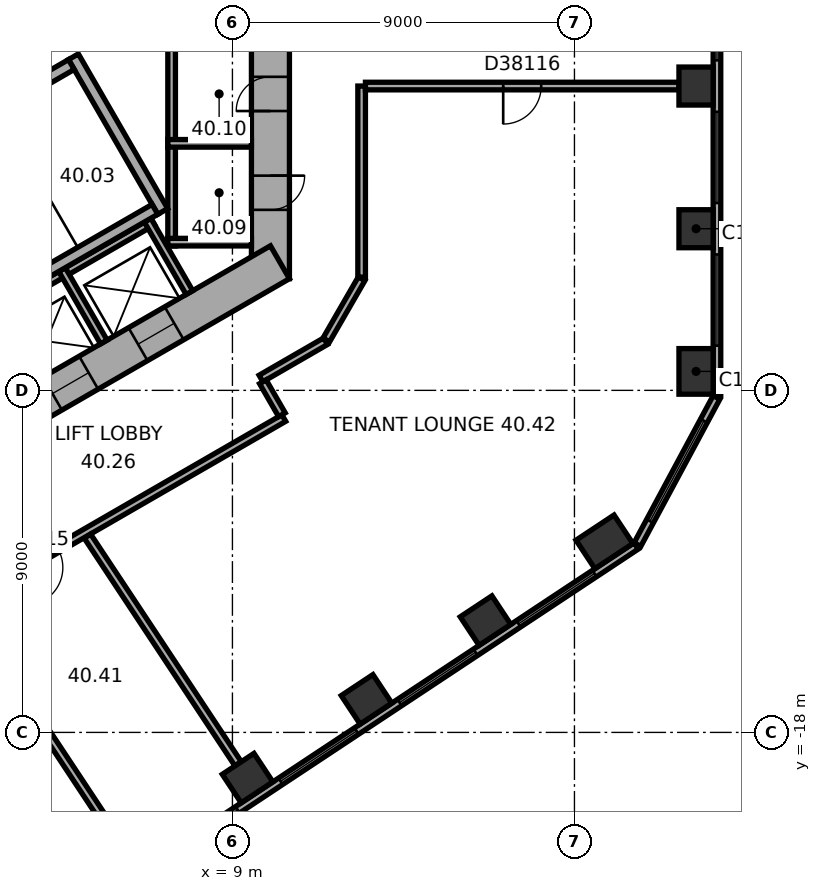
"""IFC4 building model, lengths in metres.
Left out: names, types, materials, properties, quantities, classifications, styles, units other than length and angle.
Written with IfcOpenShell. Run it as: python <this file> out.ifc"""

import sys

from ifc_helpers import new_model, si_unit, direction, frame, frame_2d, origin, origin_2d, place, context, subcontext, project, spatial, rectangle, extrude, element, fill, save


model = new_model("IFC4")
c1 = context("Model", 3, precision=1e-05, world=origin(), true_north=direction((0.0, 1.0)))
c2 = subcontext(c1, "Body", "Model", "MODEL_VIEW")
j1 = project(units=[si_unit("LENGTHUNIT", "METRE"), si_unit("PLANEANGLEUNIT", "RADIAN")], contexts=[c1])
p1 = place(None, origin())
s1 = spatial("IfcSite", under=j1, at=p1, CompositionType="ELEMENT")
p2 = place(p1, origin())
s2 = spatial("IfcBuilding", under=s1, at=p2, CompositionType="ELEMENT")
p3 = place(p2, frame((0.0, 0.0, 165.1)))
s3 = spatial("IfcBuildingStorey", under=s2, at=p3, CompositionType="ELEMENT", Elevation=165.1)
p4 = place(p3, frame((21.2, -8.501, 0.0), z_axis=(0.0, 0.0, 1.0), x_axis=(0.0, 1.0, 0.0)))
e1 = element("IfcColumn", 1, at=p4, inside=s3, PredefinedType="COLUMN", context=c2, shape_type="SweptSolid", body=[
    extrude(rectangle(XDim=1.2, YDim=0.9, at=origin_2d()), origin(), (0.0, 0.0, 1.0), 3.7),
])
for number, where, z_axis, x_axis in (
    (2, (21.2, -4.747, 0.0), (0.0, 0.0, 1.0), (0.0, 1.0, 0.0)),
    (3, (21.2, -0.993, 0.0), (0.0, 0.0, 1.0), (0.0, 1.0, 0.0)),
    (4, (9.398, -19.202, 0.0), (0.0, 0.0, 1.0), (0.834, 0.552, 0.0)),
    (5, (12.529, -17.13, 0.0), (0.0, 0.0, 1.0), (0.834, 0.552, 0.0)),
    (6, (15.659, -15.058, 0.0), (0.0, 0.0, 1.0), (0.834, 0.552, 0.0)),
):
    element("IfcColumn", number, at=place(p3, frame(where, z_axis=z_axis, x_axis=x_axis)), inside=s3, PredefinedType="COLUMN", context=c2, shape_type="SweptSolid", body=[
        extrude(rectangle(XDim=1.0, YDim=0.9, at=origin_2d()), origin(), (0.0, 0.0, 1.0), 3.7),
    ])
p5 = place(p3, frame((18.79, -12.986, 0.0), z_axis=(0.0, 0.0, 1.0), x_axis=(0.833885822067, 0.551936985312, 0.0)))
e7 = element("IfcColumn", 7, at=p5, inside=s3, PredefinedType="COLUMN", context=c2, shape_type="SweptSolid", body=[
    extrude(rectangle(XDim=1.2, YDim=0.9, at=origin_2d()), origin(), (0.0, 0.0, 1.0), 3.7),
])
p6 = place(p3, frame((10.0, -6.062, 0.0), z_axis=(0.0, 0.0, 1.0), x_axis=(0.0, 1.0, 0.0)))
e8 = element("IfcWall", 8, at=p6, inside=s3, PredefinedType="SHEAR", context=c2, shape_type="SweptSolid", body=[
    extrude(rectangle(XDim=12.125, YDim=1.0, at=frame_2d((6.062, 0.0))), origin(), (0.0, 0.0, 1.0), 3.7),
])
p7 = place(p6, frame((6.262, 0.0, 0.0)))
e9 = element("IfcOpeningElement", 9, at=p7, cuts=e8, PredefinedType="OPENING", context=c2, shape_type="SweptSolid", body=[
    extrude(rectangle(XDim=1.5, YDim=2.1, at=frame_2d((0.75, 1.05))), frame((0.0, 0.51, 0.0), z_axis=(0.0, -1.0, 0.0), x_axis=(1.0, 0.0, 0.0)), (0.0, 0.0, 1.0), 1.02),
])
p8 = place(p6, frame((1.812, 0.0, 0.0)))
e10 = element("IfcOpeningElement", 10, at=p8, cuts=e8, PredefinedType="OPENING", context=c2, shape_type="SweptSolid", body=[
    extrude(rectangle(XDim=0.9, YDim=2.1, at=frame_2d((0.45, 1.05))), frame((0.0, 0.51, 0.0), z_axis=(0.0, -1.0, 0.0), x_axis=(1.0, 0.0, 0.0)), (0.0, 0.0, 1.0), 1.02),
])
p9 = place(p6, frame((4.412, 0.0, 0.0)))
e11 = element("IfcOpeningElement", 11, at=p9, cuts=e8, PredefinedType="OPENING", context=c2, shape_type="SweptSolid", body=[
    extrude(rectangle(XDim=0.9, YDim=2.1, at=frame_2d((0.45, 1.05))), frame((0.0, 0.51, 0.0), z_axis=(0.0, -1.0, 0.0), x_axis=(1.0, 0.0, 0.0)), (0.0, 0.0, 1.0), 1.02),
])
p10 = place(p3, frame((-0.25, -11.691, 0.0), z_axis=(0.0, 0.0, 1.0), x_axis=(0.866022616891, 0.50000482701, 0.0)))
e12 = element("IfcWall", 12, at=p10, inside=s3, PredefinedType="SHEAR", context=c2, shape_type="SweptSolid", body=[
    extrude(rectangle(XDim=12.125, YDim=1.0, at=frame_2d((6.062, 0.0))), origin(), (0.0, 0.0, 1.0), 3.7),
])
p11 = place(p10, frame((2.612, 0.0, 0.0)))
e13 = element("IfcOpeningElement", 13, at=p11, cuts=e12, PredefinedType="OPENING", context=c2, shape_type="SweptSolid", body=[
    extrude(rectangle(XDim=1.1, YDim=2.1, at=frame_2d((0.55, 1.05))), frame((0.0, 0.51, 0.0), z_axis=(0.0, -1.0, 0.0), x_axis=(1.0, 0.0, 0.0)), (0.0, 0.0, 1.0), 1.02),
])
p12 = place(p10, frame((5.212, 0.0, 0.0)))
e14 = element("IfcOpeningElement", 14, at=p12, cuts=e12, PredefinedType="OPENING", context=c2, shape_type="SweptSolid", body=[
    extrude(rectangle(XDim=1.1, YDim=2.1, at=frame_2d((0.55, 1.05))), frame((0.0, 0.51, 0.0), z_axis=(0.0, -1.0, 0.0), x_axis=(1.0, 0.0, 0.0)), (0.0, 0.0, 1.0), 1.02),
])
p13 = place(p10, frame((7.812, 0.0, 0.0)))
e15 = element("IfcOpeningElement", 15, at=p13, cuts=e12, PredefinedType="OPENING", context=c2, shape_type="SweptSolid", body=[
    extrude(rectangle(XDim=1.1, YDim=2.1, at=frame_2d((0.55, 1.05))), frame((0.0, 0.51, 0.0), z_axis=(0.0, -1.0, 0.0), x_axis=(1.0, 0.0, 0.0)), (0.0, 0.0, 1.0), 1.02),
])
p14 = place(p3, frame((21.75, -9.138, 0.0), z_axis=(0.0, 0.0, 1.0), x_axis=(0.0, 1.0, 0.0)))
e16 = element("IfcWall", 16, at=p14, inside=s3, PredefinedType="STANDARD", context=c2, shape_type="SweptSolid", body=[
    extrude(rectangle(XDim=20.044, YDim=0.2, at=frame_2d((10.022, 0.0))), origin(), (0.0, 0.0, 1.0), 3.7),
])
p15 = place(p14, frame((1.314, 0.0, 0.9)))
e17 = element("IfcOpeningElement", 17, at=p15, cuts=e16, PredefinedType="OPENING", context=c2, shape_type="SweptSolid", body=[
    extrude(rectangle(XDim=2.4, YDim=2.0, at=frame_2d((1.2, 1.0))), frame((0.0, 0.11, 0.0), z_axis=(0.0, -1.0, 0.0), x_axis=(1.0, 0.0, 0.0)), (0.0, 0.0, 1.0), 0.22),
])
p16 = place(p14, frame((5.069, 0.0, 0.9)))
e18 = element("IfcOpeningElement", 18, at=p16, cuts=e16, PredefinedType="OPENING", context=c2, shape_type="SweptSolid", body=[
    extrude(rectangle(XDim=2.4, YDim=2.0, at=frame_2d((1.2, 1.0))), frame((0.0, 0.11, 0.0), z_axis=(0.0, -1.0, 0.0), x_axis=(1.0, 0.0, 0.0)), (0.0, 0.0, 1.0), 0.22),
])
p17 = place(p14, frame((8.823, 0.0, 0.9)))
e19 = element("IfcOpeningElement", 19, at=p17, cuts=e16, PredefinedType="OPENING", context=c2, shape_type="SweptSolid", body=[
    extrude(rectangle(XDim=2.4, YDim=2.0, at=frame_2d((1.2, 1.0))), frame((0.0, 0.11, 0.0), z_axis=(0.0, -1.0, 0.0), x_axis=(1.0, 0.0, 0.0)), (0.0, 0.0, 1.0), 0.22),
])
p18 = place(p14, frame((12.577, 0.0, 0.9)))
e20 = element("IfcOpeningElement", 20, at=p18, cuts=e16, PredefinedType="OPENING", context=c2, shape_type="SweptSolid", body=[
    extrude(rectangle(XDim=2.4, YDim=2.0, at=frame_2d((1.2, 1.0))), frame((0.0, 0.11, 0.0), z_axis=(0.0, -1.0, 0.0), x_axis=(1.0, 0.0, 0.0)), (0.0, 0.0, 1.0), 0.22),
])
p19 = place(p14, frame((16.331, 0.0, 0.9)))
e21 = element("IfcOpeningElement", 21, at=p19, cuts=e16, PredefinedType="OPENING", context=c2, shape_type="SweptSolid", body=[
    extrude(rectangle(XDim=2.4, YDim=2.0, at=frame_2d((1.2, 1.0))), frame((0.0, 0.11, 0.0), z_axis=(0.0, -1.0, 0.0), x_axis=(1.0, 0.0, 0.0)), (0.0, 0.0, 1.0), 0.22),
])
p20 = place(p3, frame((2.911, -24.156, 0.0), z_axis=(0.0, 0.0, 1.0), x_axis=(0.833882163564, 0.551942512668, 0.0)))
e22 = element("IfcWall", 22, at=p20, inside=s3, PredefinedType="STANDARD", context=c2, shape_type="SweptSolid", body=[
    extrude(rectangle(XDim=20.044, YDim=0.2, at=frame_2d((10.022, 0.0))), origin(), (0.0, 0.0, 1.0), 3.7),
])
p21 = place(p20, frame((1.313, 0.0, 0.9)))
e23 = element("IfcOpeningElement", 23, at=p21, cuts=e22, PredefinedType="OPENING", context=c2, shape_type="SweptSolid", body=[
    extrude(rectangle(XDim=2.4, YDim=2.0, at=frame_2d((1.2, 1.0))), frame((0.0, 0.11, 0.0), z_axis=(0.0, -1.0, 0.0), x_axis=(1.0, 0.0, 0.0)), (0.0, 0.0, 1.0), 0.22),
])
p22 = place(p20, frame((5.067, 0.0, 0.9)))
e24 = element("IfcOpeningElement", 24, at=p22, cuts=e22, PredefinedType="OPENING", context=c2, shape_type="SweptSolid", body=[
    extrude(rectangle(XDim=2.4, YDim=2.0, at=frame_2d((1.2, 1.0))), frame((0.0, 0.11, 0.0), z_axis=(0.0, -1.0, 0.0), x_axis=(1.0, 0.0, 0.0)), (0.0, 0.0, 1.0), 0.22),
])
p23 = place(p20, frame((8.821, 0.0, 0.9)))
e25 = element("IfcOpeningElement", 25, at=p23, cuts=e22, PredefinedType="OPENING", context=c2, shape_type="SweptSolid", body=[
    extrude(rectangle(XDim=2.4, YDim=2.0, at=frame_2d((1.2, 1.0))), frame((0.0, 0.11, 0.0), z_axis=(0.0, -1.0, 0.0), x_axis=(1.0, 0.0, 0.0)), (0.0, 0.0, 1.0), 0.22),
])
p24 = place(p20, frame((12.575, 0.0, 0.9)))
e26 = element("IfcOpeningElement", 26, at=p24, cuts=e22, PredefinedType="OPENING", context=c2, shape_type="SweptSolid", body=[
    extrude(rectangle(XDim=2.4, YDim=2.0, at=frame_2d((1.2, 1.0))), frame((0.0, 0.11, 0.0), z_axis=(0.0, -1.0, 0.0), x_axis=(1.0, 0.0, 0.0)), (0.0, 0.0, 1.0), 0.22),
])
p25 = place(p20, frame((16.329, 0.0, 0.9)))
e27 = element("IfcOpeningElement", 27, at=p25, cuts=e22, PredefinedType="OPENING", context=c2, shape_type="SweptSolid", body=[
    extrude(rectangle(XDim=2.4, YDim=2.0, at=frame_2d((1.2, 1.0))), frame((0.0, 0.11, 0.0), z_axis=(0.0, -1.0, 0.0), x_axis=(1.0, 0.0, 0.0)), (0.0, 0.0, 1.0), 0.22),
])
p26 = place(p3, frame((19.658, -13.057, 0.0), z_axis=(0.0, 0.0, 1.0), x_axis=(0.473307879841, 0.880897071672, 0.0)))
e28 = element("IfcWall", 28, at=p26, inside=s3, PredefinedType="STANDARD", context=c2, shape_type="SweptSolid", body=[
    extrude(rectangle(XDim=4.395, YDim=0.2, at=frame_2d((2.197, 0.0))), origin(), (0.0, 0.0, 1.0), 3.7),
])
p27 = place(p26, frame((0.698, 0.0, 0.9)))
e29 = element("IfcOpeningElement", 29, at=p27, cuts=e28, PredefinedType="OPENING", context=c2, shape_type="SweptSolid", body=[
    extrude(rectangle(XDim=3.0, YDim=2.0, at=frame_2d((1.5, 1.0))), frame((0.0, 0.11, 0.0), z_axis=(0.0, -1.0, 0.0), x_axis=(1.0, 0.0, 0.0)), (0.0, 0.0, 1.0), 0.22),
])
p28 = place(p3, frame((7.4, -5.2, 0.0), z_axis=(0.0, 0.0, 1.0), x_axis=(0.0, 1.0, 0.0)))
e30 = element("IfcWall", 30, at=p28, inside=s3, PredefinedType="PARTITIONING", context=c2, shape_type="SweptSolid", body=[
    extrude(rectangle(XDim=5.4, YDim=0.2, at=frame_2d((2.7, 0.0))), origin(), (0.0, 0.0, 1.0), 3.42),
])
for number, where, z_axis, x_axis in (
    (31, (7.3, -5.1, 0.0), (0.0, 0.0, 1.0), (1.0, 0.0, 0.0)),
    (32, (7.3, -2.5, 0.0), (0.0, 0.0, 1.0), (1.0, 0.0, 0.0)),
):
    element("IfcWall", number, at=place(p3, frame(where, z_axis=z_axis, x_axis=x_axis)), inside=s3, PredefinedType="PARTITIONING", context=c2, shape_type="SweptSolid", body=[
        extrude(rectangle(XDim=2.2, YDim=0.2, at=frame_2d((1.1, 0.0))), origin(), (0.0, 0.0, 1.0), 3.42),
    ])
p29 = place(p3, frame((-0.024, -8.559, 0.0), z_axis=(0.0, 0.0, 1.0), x_axis=(0.866026010844, 0.49999894854, 0.0)))
e33 = element("IfcWall", 33, at=p29, inside=s3, PredefinedType="PARTITIONING", context=c2, shape_type="SweptSolid", body=[
    extrude(rectangle(XDim=8.0, YDim=0.2, at=frame_2d((4.0, 0.0))), origin(), (0.0, 0.0, 1.0), 3.42),
])
for number, where, z_axis, x_axis in (
    (34, (4.516, -5.822, 0.0), (0.0, 0.0, 1.0), (0.5, -0.866, 0.0)),
    (35, (6.768, -4.522, 0.0), (0.0, 0.0, 1.0), (0.5, -0.866, 0.0)),
):
    element("IfcWall", number, at=place(p3, frame(where, z_axis=z_axis, x_axis=x_axis)), inside=s3, PredefinedType="PARTITIONING", context=c2, shape_type="SweptSolid", body=[
        extrude(rectangle(XDim=2.2, YDim=0.2, at=frame_2d((1.1, 0.0))), origin(), (0.0, 0.0, 1.0), 3.42),
    ])
p30 = place(p3, frame((4.816, -0.222, 0.0), z_axis=(0.0, 0.0, 1.0), x_axis=(0.499977259774, -0.866038532462, 0.0)))
e36 = element("IfcWall", 36, at=p30, inside=s3, PredefinedType="SHEAR", context=c2, shape_type="SweptSolid", body=[
    extrude(rectangle(XDim=4.7, YDim=0.3, at=frame_2d((2.35, 0.0))), origin(), (0.0, 0.0, 1.0), 3.42),
])
for number, where, z_axis, x_axis in (
    (37, (-1.353, -3.957, 0.0), (0.0, 0.0, 1.0), (0.866, 0.5, 0.0)),
    (38, (0.847, -7.767, 0.0), (0.0, 0.0, 1.0), (0.866, 0.5, 0.0)),
):
    element("IfcWall", number, at=place(p3, frame(where, z_axis=z_axis, x_axis=x_axis)), inside=s3, PredefinedType="SHEAR", context=c2, shape_type="SweptSolid", body=[
        extrude(rectangle(XDim=7.06, YDim=0.3, at=frame_2d((3.53, 0.0))), origin(), (0.0, 0.0, 1.0), 3.42),
    ])
p31 = place(p3, frame((2.816, -14.079, 0.0), z_axis=(0.0, 0.0, 1.0), x_axis=(0.866021128829, 0.500007404367, 0.0)))
e39 = element("IfcWall", 39, at=p31, inside=s3, PredefinedType="PARTITIONING", context=c2, shape_type="SweptSolid", body=[
    extrude(rectangle(XDim=8.702, YDim=0.2, at=frame_2d((4.351, 0.0))), origin(), (0.0, 0.0, 1.0), 3.42),
])
p32 = place(p31, frame((0.833, 0.0, 0.0)))
e40 = element("IfcOpeningElement", 40, at=p32, cuts=e39, PredefinedType="OPENING", context=c2, shape_type="SweptSolid", body=[
    extrude(rectangle(XDim=1.0, YDim=2.1, at=frame_2d((0.5, 1.05))), frame((0.0, 0.11, 0.0), z_axis=(0.0, -1.0, 0.0), x_axis=(1.0, 0.0, 0.0)), (0.0, 0.0, 1.0), 0.22),
])
p33 = place(p3, frame((6.02, -20.899, 0.0), z_axis=(0.0, 0.0, 1.0), x_axis=(-0.551943990108, 0.833881185651, 0.0)))
e41 = element("IfcWall", 41, at=p33, inside=s3, PredefinedType="PARTITIONING", context=c2, shape_type="SweptSolid", body=[
    extrude(rectangle(XDim=8.615, YDim=0.2, at=frame_2d((4.308, 0.0))), origin(), (0.0, 0.0, 1.0), 3.42),
])
p34 = place(p3, frame((9.15, -18.827, 0.0), z_axis=(0.0, 0.0, 1.0), x_axis=(-0.551928083938, 0.83389171369, 0.0)))
e42 = element("IfcWall", 42, at=p34, inside=s3, PredefinedType="PARTITIONING", context=c2, shape_type="SweptSolid", body=[
    extrude(rectangle(XDim=7.182, YDim=0.2, at=frame_2d((3.591, 0.0))), origin(), (0.0, 0.0, 1.0), 2.87),
])
p35 = place(p3, frame((9.752, -8.688, 0.0), z_axis=(0.0, 0.0, 1.0), x_axis=(0.865974105138, 0.500088841337, 0.0)))
e43 = element("IfcWall", 43, at=p35, inside=s3, PredefinedType="PARTITIONING", context=c2, shape_type="SweptSolid", body=[
    extrude(rectangle(XDim=1.961, YDim=0.2, at=frame_2d((0.98, 0.0))), origin(), (0.0, 0.0, 1.0), 3.42),
])
p36 = place(p3, frame((10.302, -9.642, 0.0), z_axis=(0.0, 0.0, 1.0), x_axis=(-0.500074377092, 0.865982457891, 0.0)))
e44 = element("IfcWall", 44, at=p36, inside=s3, PredefinedType="PARTITIONING", context=c2, shape_type="SweptSolid", body=[
    extrude(rectangle(XDim=1.001, YDim=0.2, at=frame_2d((0.5, 0.0))), origin(), (0.0, 0.0, 1.0), 3.42),
])
p37 = place(p3, frame((11.47, -7.673, 0.0), z_axis=(0.0, 0.0, 1.0), x_axis=(0.499964847546, 0.866045698112, 0.0)))
e45 = element("IfcWall", 45, at=p37, inside=s3, PredefinedType="PARTITIONING", context=c2, shape_type="SweptSolid", body=[
    extrude(rectangle(XDim=1.86, YDim=0.2, at=frame_2d((0.93, 0.0))), origin(), (0.0, 0.0, 1.0), 3.42),
])
p38 = place(p3, frame((12.4, -6.022, 0.0), z_axis=(0.0, 0.0, 1.0), x_axis=(0.0, 1.0, 0.0)))
e46 = element("IfcWall", 46, at=p38, inside=s3, PredefinedType="PARTITIONING", context=c2, shape_type="SweptSolid", body=[
    extrude(rectangle(XDim=5.029, YDim=0.2, at=frame_2d((2.515, 0.0))), origin(), (0.0, 0.0, 1.0), 3.42),
])
p39 = place(p3, frame((12.5, -0.993, 0.0), z_axis=(0.0, 0.0, 1.0), x_axis=(1.0, 0.0, 0.0)))
e47 = element("IfcWall", 47, at=p39, inside=s3, PredefinedType="PARTITIONING", context=c2, shape_type="SweptSolid", body=[
    extrude(rectangle(XDim=8.25, YDim=0.2, at=frame_2d((4.125, 0.0))), origin(), (0.0, 0.0, 1.0), 2.87),
])
p40 = place(p39, frame((3.625, 0.0, 0.0)))
e48 = element("IfcOpeningElement", 48, at=p40, cuts=e47, PredefinedType="OPENING", context=c2, shape_type="SweptSolid", body=[
    extrude(rectangle(XDim=1.0, YDim=2.1, at=frame_2d((0.5, 1.05))), frame((0.0, 0.11, 0.0), z_axis=(0.0, -1.0, 0.0), x_axis=(1.0, 0.0, 0.0)), (0.0, 0.0, 1.0), 0.22),
])
p41 = place(p15, origin())
e49 = element("IfcWindow", 49, at=p41, inside=s3, PartitioningType="SINGLE_PANEL", PredefinedType="WINDOW", context=c2, shape_type="SweptSolid", body=[
    extrude(rectangle(XDim=2.4, YDim=2.0, at=frame_2d((1.2, 1.0))), frame((0.0, 0.03, 0.0), z_axis=(0.0, -1.0, 0.0), x_axis=(1.0, 0.0, 0.0)), (0.0, 0.0, 1.0), 0.06),
])
fill(e17, e49)
p42 = place(p16, origin())
e50 = element("IfcWindow", 50, at=p42, inside=s3, PartitioningType="SINGLE_PANEL", PredefinedType="WINDOW", context=c2, shape_type="SweptSolid", body=[
    extrude(rectangle(XDim=2.4, YDim=2.0, at=frame_2d((1.2, 1.0))), frame((0.0, 0.03, 0.0), z_axis=(0.0, -1.0, 0.0), x_axis=(1.0, 0.0, 0.0)), (0.0, 0.0, 1.0), 0.06),
])
fill(e18, e50)
p43 = place(p17, origin())
e51 = element("IfcWindow", 51, at=p43, inside=s3, PartitioningType="SINGLE_PANEL", PredefinedType="WINDOW", context=c2, shape_type="SweptSolid", body=[
    extrude(rectangle(XDim=2.4, YDim=2.0, at=frame_2d((1.2, 1.0))), frame((0.0, 0.03, 0.0), z_axis=(0.0, -1.0, 0.0), x_axis=(1.0, 0.0, 0.0)), (0.0, 0.0, 1.0), 0.06),
])
fill(e19, e51)
p44 = place(p22, origin())
e52 = element("IfcWindow", 52, at=p44, inside=s3, PartitioningType="SINGLE_PANEL", PredefinedType="WINDOW", context=c2, shape_type="SweptSolid", body=[
    extrude(rectangle(XDim=2.4, YDim=2.0, at=frame_2d((1.2, 1.0))), frame((0.0, 0.03, 0.0), z_axis=(0.0, -1.0, 0.0), x_axis=(1.0, 0.0, 0.0)), (0.0, 0.0, 1.0), 0.06),
])
fill(e24, e52)
p45 = place(p23, origin())
e53 = element("IfcWindow", 53, at=p45, inside=s3, PartitioningType="SINGLE_PANEL", PredefinedType="WINDOW", context=c2, shape_type="SweptSolid", body=[
    extrude(rectangle(XDim=2.4, YDim=2.0, at=frame_2d((1.2, 1.0))), frame((0.0, 0.03, 0.0), z_axis=(0.0, -1.0, 0.0), x_axis=(1.0, 0.0, 0.0)), (0.0, 0.0, 1.0), 0.06),
])
fill(e25, e53)
p46 = place(p24, origin())
e54 = element("IfcWindow", 54, at=p46, inside=s3, PartitioningType="SINGLE_PANEL", PredefinedType="WINDOW", context=c2, shape_type="SweptSolid", body=[
    extrude(rectangle(XDim=2.4, YDim=2.0, at=frame_2d((1.2, 1.0))), frame((0.0, 0.03, 0.0), z_axis=(0.0, -1.0, 0.0), x_axis=(1.0, 0.0, 0.0)), (0.0, 0.0, 1.0), 0.06),
])
fill(e26, e54)
p47 = place(p25, origin())
e55 = element("IfcWindow", 55, at=p47, inside=s3, PartitioningType="SINGLE_PANEL", PredefinedType="WINDOW", context=c2, shape_type="SweptSolid", body=[
    extrude(rectangle(XDim=2.4, YDim=2.0, at=frame_2d((1.2, 1.0))), frame((0.0, 0.03, 0.0), z_axis=(0.0, -1.0, 0.0), x_axis=(1.0, 0.0, 0.0)), (0.0, 0.0, 1.0), 0.06),
])
fill(e27, e55)
p48 = place(p27, origin())
e56 = element("IfcWindow", 56, at=p48, inside=s3, PartitioningType="SINGLE_PANEL", PredefinedType="WINDOW", context=c2, shape_type="SweptSolid", body=[
    extrude(rectangle(XDim=3.0, YDim=2.0, at=frame_2d((1.5, 1.0))), frame((0.0, 0.03, 0.0), z_axis=(0.0, -1.0, 0.0), x_axis=(1.0, 0.0, 0.0)), (0.0, 0.0, 1.0), 0.06),
])
fill(e29, e56)
p49 = place(p8, origin())
e57 = element("IfcDoor", 57, at=p49, inside=s3, OperationType="SINGLE_SWING_LEFT", PredefinedType="DOOR", context=c2, shape_type="SweptSolid", body=[
    extrude(rectangle(XDim=0.9, YDim=2.1, at=frame_2d((0.45, 1.05))), frame((0.0, 0.025, 0.0), z_axis=(0.0, -1.0, 0.0), x_axis=(1.0, 0.0, 0.0)), (0.0, 0.0, 1.0), 0.05),
])
fill(e10, e57)
p50 = place(p9, origin())
e58 = element("IfcDoor", 58, at=p50, inside=s3, OperationType="SINGLE_SWING_LEFT", PredefinedType="DOOR", context=c2, shape_type="SweptSolid", body=[
    extrude(rectangle(XDim=0.9, YDim=2.1, at=frame_2d((0.45, 1.05))), frame((0.0, 0.025, 0.0), z_axis=(0.0, -1.0, 0.0), x_axis=(1.0, 0.0, 0.0)), (0.0, 0.0, 1.0), 0.05),
])
fill(e11, e58)
p51 = place(p12, origin())
e59 = element("IfcDoor", 59, at=p51, inside=s3, OperationType="DOUBLE_DOOR_SLIDING", PredefinedType="DOOR", context=c2, shape_type="SweptSolid", body=[
    extrude(rectangle(XDim=1.1, YDim=2.1, at=frame_2d((0.55, 1.05))), frame((0.0, 0.025, 0.0), z_axis=(0.0, -1.0, 0.0), x_axis=(1.0, 0.0, 0.0)), (0.0, 0.0, 1.0), 0.05),
])
fill(e14, e59)
p52 = place(p13, origin())
e60 = element("IfcDoor", 60, at=p52, inside=s3, OperationType="DOUBLE_DOOR_SLIDING", PredefinedType="DOOR", context=c2, shape_type="SweptSolid", body=[
    extrude(rectangle(XDim=1.1, YDim=2.1, at=frame_2d((0.55, 1.05))), frame((0.0, 0.025, 0.0), z_axis=(0.0, -1.0, 0.0), x_axis=(1.0, 0.0, 0.0)), (0.0, 0.0, 1.0), 0.05),
])
fill(e15, e60)
p53 = place(p32, origin())
e61 = element("IfcDoor", 61, at=p53, inside=s3, OperationType="SINGLE_SWING_LEFT", PredefinedType="DOOR", context=c2, shape_type="SweptSolid", body=[
    extrude(rectangle(XDim=1.0, YDim=2.1, at=frame_2d((0.5, 1.05))), frame((0.0, 0.025, 0.0), z_axis=(0.0, -1.0, 0.0), x_axis=(1.0, 0.0, 0.0)), (0.0, 0.0, 1.0), 0.05),
])
fill(e40, e61)
p54 = place(p40, origin())
e62 = element("IfcDoor", 62, at=p54, inside=s3, OperationType="SINGLE_SWING_LEFT", PredefinedType="DOOR", context=c2, shape_type="SweptSolid", body=[
    extrude(rectangle(XDim=1.0, YDim=2.1, at=frame_2d((0.5, 1.05))), frame((0.0, 0.025, 0.0), z_axis=(0.0, -1.0, 0.0), x_axis=(1.0, 0.0, 0.0)), (0.0, 0.0, 1.0), 0.05),
])
fill(e48, e62)
save(model, sys.argv[1])
